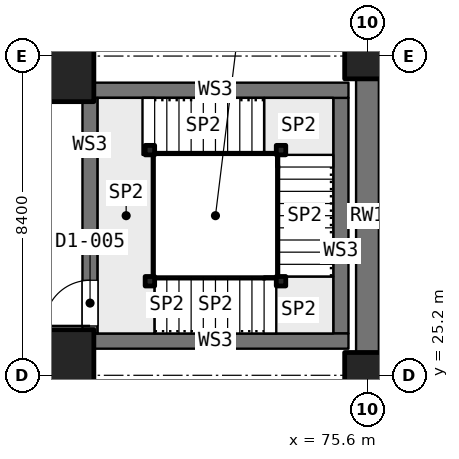
"""IFC4 building model, lengths in metres.
Left out: names, types, materials, properties, quantities, classifications, styles, units other than length and angle.
Written with IfcOpenShell. Run it as: python <this file> out.ifc"""

import sys

from ifc_helpers import new_model, si_unit, direction, frame, frame_2d, origin, origin_2d, place, context, subcontext, project, spatial, rectangle, extrude, element, fill, save


model = new_model("IFC4")
c1 = context("Model", 3, precision=1e-05, world=origin(), true_north=direction((0.0, 1.0)))
c2 = subcontext(c1, "Body", "Model", "MODEL_VIEW")
j1 = project(units=[si_unit("LENGTHUNIT", "METRE"), si_unit("PLANEANGLEUNIT", "RADIAN")], contexts=[c1])
p1 = place(None, origin())
s1 = spatial("IfcSite", under=j1, at=p1, CompositionType="ELEMENT")
p2 = place(p1, origin())
s2 = spatial("IfcBuilding", under=s1, at=p2, CompositionType="ELEMENT")
p3 = place(p2, frame((0.0, 0.0, -9.9)))
s3 = spatial("IfcBuildingStorey", under=s2, at=p3, CompositionType="ELEMENT", Elevation=-9.9)
for number, where, z_axis, x_axis in (
    (1, (67.2, 25.2, 0.0), (0.0, 0.0, 1.0), (1.0, 0.0, 0.0)),
    (2, (67.2, 33.6, 0.0), (0.0, 0.0, 1.0), (1.0, 0.0, 0.0)),
):
    element("IfcColumn", number, at=place(p3, frame(where, z_axis=z_axis, x_axis=x_axis)), inside=s3, PredefinedType="COLUMN", context=c2, shape_type="SweptSolid", body=[
        extrude(rectangle(XDim=2.4, YDim=2.4, at=origin_2d()), origin(), (0.0, 0.0, 1.0), 4.5),
    ])
for number, where, z_axis, x_axis in (
    (3, (75.6, 25.2, 0.0), (0.0, 0.0, 1.0), (1.0, 0.0, 0.0)),
    (4, (75.6, 33.6, 0.0), (0.0, 0.0, 1.0), (1.0, 0.0, 0.0)),
):
    element("IfcColumn", number, at=place(p3, frame(where, z_axis=z_axis, x_axis=x_axis)), inside=s3, PredefinedType="COLUMN", context=c2, shape_type="SweptSolid", body=[
        extrude(rectangle(XDim=1.2, YDim=1.2, at=origin_2d()), origin(), (0.0, 0.0, 1.0), 4.5),
    ])
p4 = place(p3, frame((75.6, 25.8, 0.0), z_axis=(0.0, 0.0, 1.0), x_axis=(0.0, 1.0, 0.0)))
e5 = element("IfcWall", 5, at=p4, inside=s3, PredefinedType="SOLIDWALL", context=c2, shape_type="SweptSolid", body=[
    extrude(rectangle(XDim=7.2, YDim=0.6, at=frame_2d((3.6, 0.0))), origin(), (0.0, 0.0, 1.0), 4.2),
])
for number, where, z_axis, x_axis in (
    (6, (68.1, 26.1, 0.0), (0.0, 0.0, 1.0), (1.0, 0.0, 0.0)),
    (7, (68.1, 32.7, 0.0), (0.0, 0.0, 1.0), (1.0, 0.0, 0.0)),
):
    element("IfcWall", number, at=place(p3, frame(where, z_axis=z_axis, x_axis=x_axis)), inside=s3, PredefinedType="SOLIDWALL", context=c2, shape_type="SweptSolid", body=[
        extrude(rectangle(XDim=7.0, YDim=0.4, at=frame_2d((3.5, 0.0))), origin(), (0.0, 0.0, 1.0), 4.2),
    ])
p5 = place(p3, frame((68.3, 26.3, 0.0), z_axis=(0.0, 0.0, 1.0), x_axis=(0.0, 1.0, 0.0)))
e8 = element("IfcWall", 8, at=p5, inside=s3, PredefinedType="SOLIDWALL", context=c2, shape_type="SweptSolid", body=[
    extrude(rectangle(XDim=6.2, YDim=0.4, at=frame_2d((3.1, 0.0))), origin(), (0.0, 0.0, 1.0), 4.2),
])
p6 = place(p5, frame((0.2, 0.0, 0.0)))
e9 = element("IfcOpeningElement", 9, at=p6, cuts=e8, PredefinedType="OPENING", context=c2, shape_type="SweptSolid", body=[
    extrude(rectangle(XDim=1.2, YDim=2.1, at=frame_2d((0.6, 1.05))), frame((0.0, 0.21, 0.0), z_axis=(0.0, -1.0, 0.0), x_axis=(1.0, 0.0, 0.0)), (0.0, 0.0, 1.0), 0.42),
])
p7 = place(p3, frame((74.9, 26.3, 0.0), z_axis=(0.0, 0.0, 1.0), x_axis=(0.0, 1.0, 0.0)))
e10 = element("IfcWall", 10, at=p7, inside=s3, PredefinedType="SOLIDWALL", context=c2, shape_type="SweptSolid", body=[
    extrude(rectangle(XDim=6.2, YDim=0.4, at=frame_2d((3.1, 0.0))), origin(), (0.0, 0.0, 1.0), 4.2),
])
for number, where, z_axis, x_axis in (
    (11, (69.875, 27.675, 0.0), (0.0, 0.0, 1.0), (1.0, 0.0, 0.0)),
    (12, (73.325, 27.675, 0.0), (0.0, 0.0, 1.0), (1.0, 0.0, 0.0)),
    (13, (73.325, 31.125, 0.0), (0.0, 0.0, 1.0), (1.0, 0.0, 0.0)),
    (14, (69.875, 31.125, 0.0), (0.0, 0.0, 1.0), (1.0, 0.0, 0.0)),
):
    element("IfcColumn", number, at=place(p3, frame(where, z_axis=z_axis, x_axis=x_axis)), inside=s3, PredefinedType="COLUMN", context=c2, shape_type="SweptSolid", body=[
        extrude(rectangle(XDim=0.25, YDim=0.25, at=origin_2d()), origin(), (0.0, 0.0, 1.0), 4.5),
    ])
p8 = place(p6, origin())
e15 = element("IfcDoor", 15, at=p8, inside=s3, OperationType="SINGLE_SWING_RIGHT", PredefinedType="DOOR", context=c2, shape_type="SweptSolid", body=[
    extrude(rectangle(XDim=1.2, YDim=2.1, at=frame_2d((0.6, 1.05))), frame((0.0, 0.025, 0.0), z_axis=(0.0, -1.0, 0.0), x_axis=(1.0, 0.0, 0.0)), (0.0, 0.0, 1.0), 0.05),
])
fill(e9, e15)
save(model, sys.argv[1])
